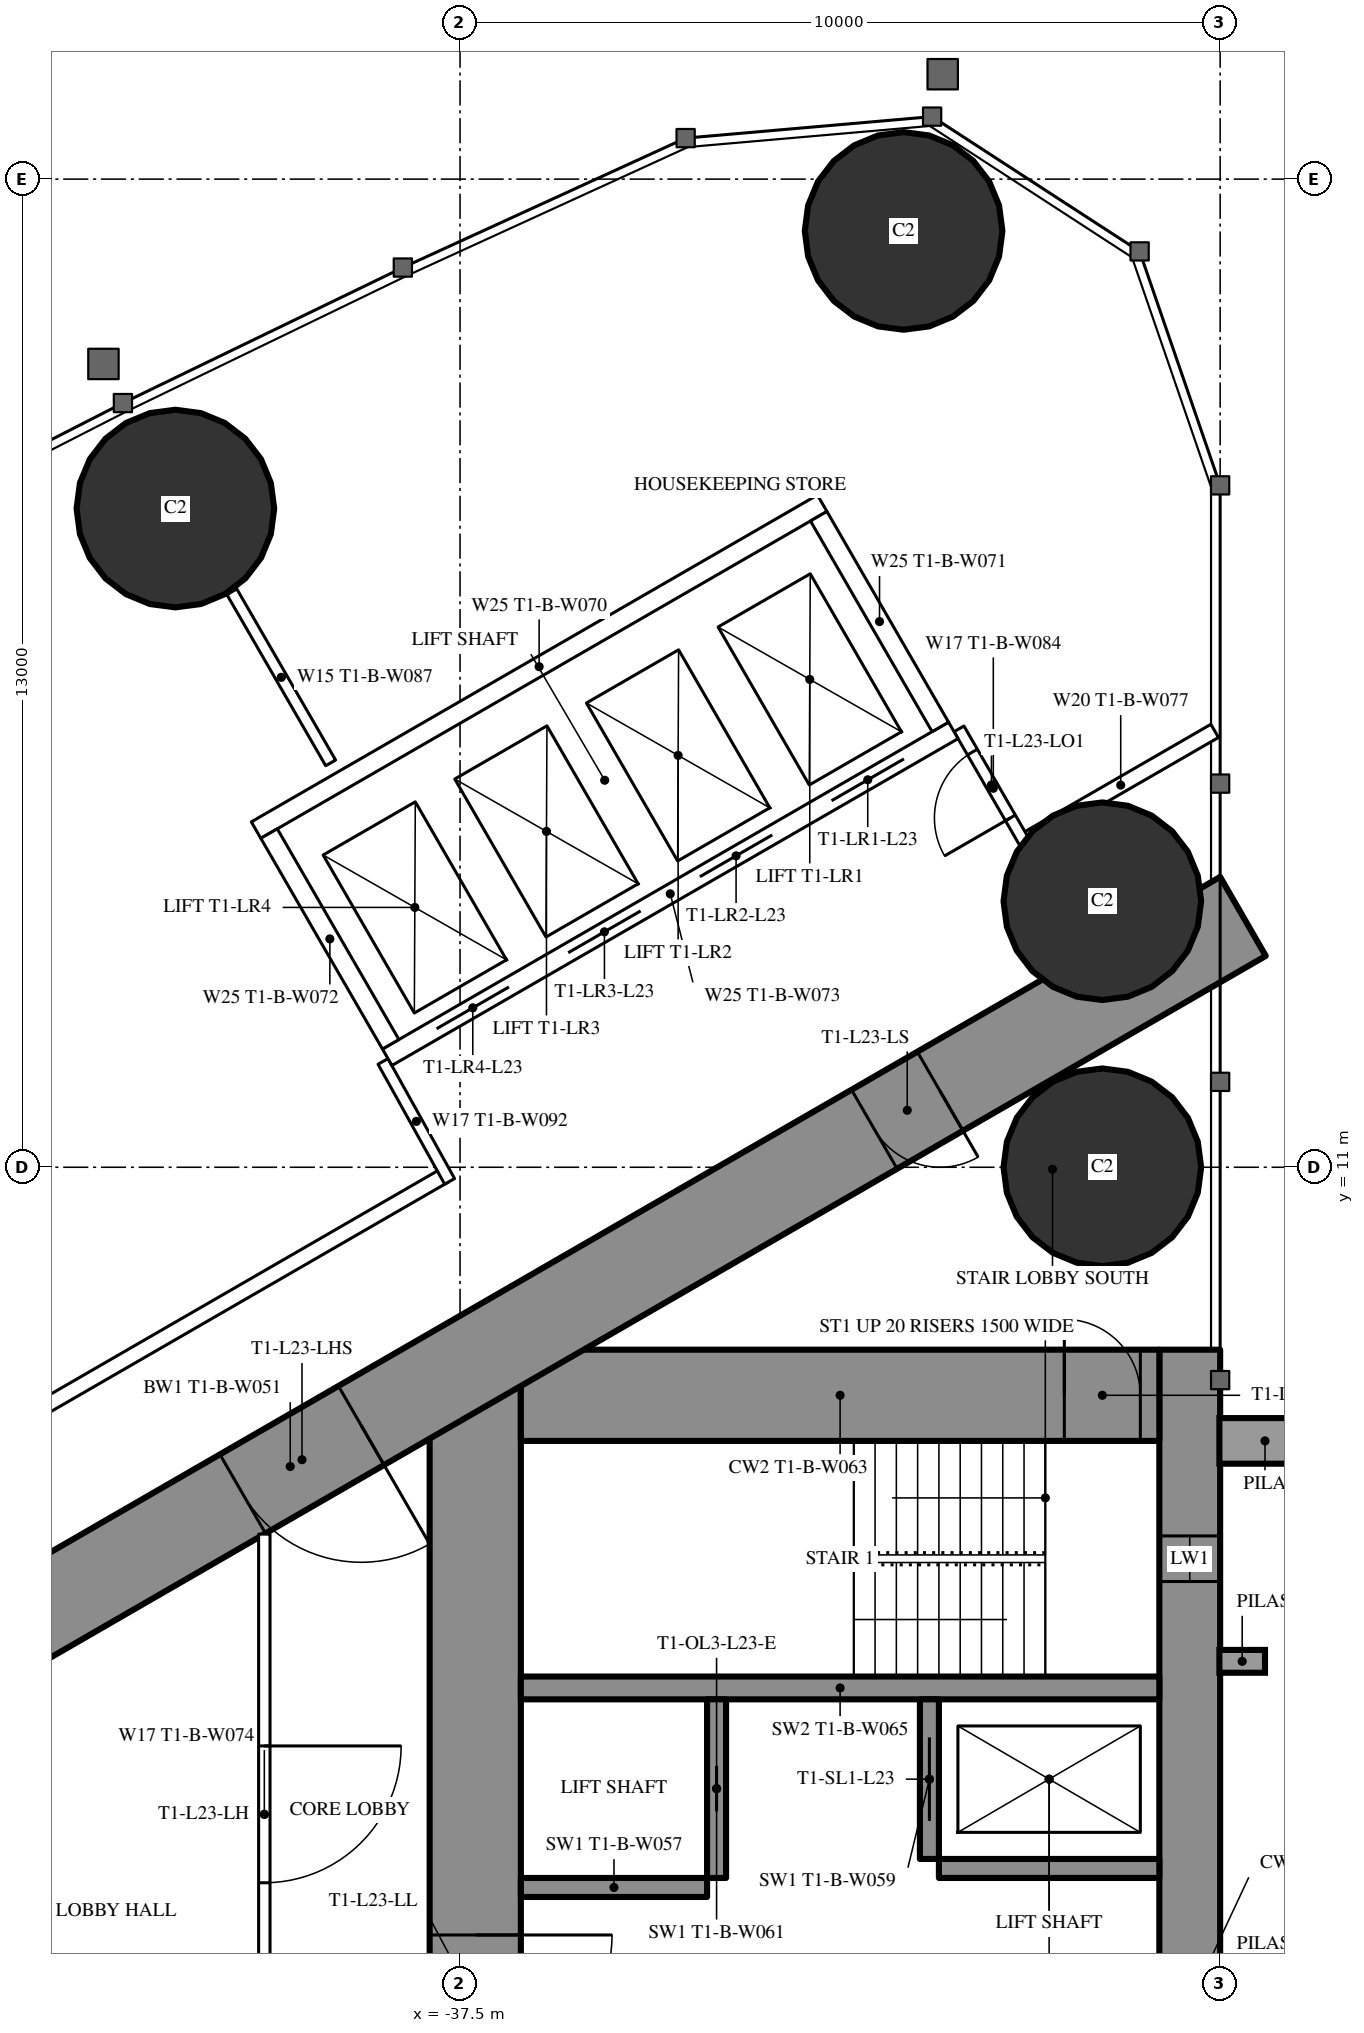
"""IFC4 building model, lengths in metres.
Left out: names, types, materials, properties, quantities, classifications, styles, units other than length and angle.
Written with IfcOpenShell. Run it as: python <this file> out.ifc"""

import sys

from ifc_helpers import new_model, si_unit, direction, frame, frame_2d, origin, origin_2d, place, context, subcontext, project, spatial, rectangle, hollow_circle, extrude, element, fill, save


model = new_model("IFC4")
c1 = context("Model", 3, precision=1e-05, world=origin(), true_north=direction((0.0, 1.0)))
c2 = subcontext(c1, "Body", "Model", "MODEL_VIEW")
j1 = project(units=[si_unit("LENGTHUNIT", "METRE"), si_unit("PLANEANGLEUNIT", "RADIAN")], contexts=[c1])
p1 = place(None, origin())
s1 = spatial("IfcSite", under=j1, at=p1, CompositionType="ELEMENT")
p2 = place(p1, origin())
s2 = spatial("IfcBuilding", under=s1, at=p2, CompositionType="ELEMENT")
p3 = place(p2, frame((0.0, 0.0, 90.6)))
s3 = spatial("IfcBuildingStorey", under=s2, at=p3, CompositionType="ELEMENT", Elevation=90.6)
for number, where, z_axis, x_axis in (
    (1, (-31.665, 23.318, 0.0), (0.0, 0.0, 1.0), (1.0, 0.0, 0.0)),
    (2, (-29.05, 11.0, 0.0), (0.0, 0.0, 1.0), (1.0, 0.0, 0.0)),
    (3, (-29.05, 14.5, 0.0), (0.0, 0.0, 1.0), (1.0, 0.0, 0.0)),
    (4, (-41.245, 19.666, 0.0), (0.0, 0.0, 1.0), (1.0, 0.0, 0.0)),
):
    element("IfcColumn", number, at=place(p3, frame(where, z_axis=z_axis, x_axis=x_axis)), inside=s3, PredefinedType="COLUMN", context=c2, shape_type="SweptSolid", body=[
        extrude(hollow_circle(Radius=1.3, WallThickness=0.1, at=origin_2d()), origin(), (0.0, 0.0, 1.0), 3.5),
    ])
p4 = place(p3, frame((-27.9, 8.6, 0.0), z_axis=(0.0, 0.0, 1.0), x_axis=(0.0, -1.0, 0.0)))
e5 = element("IfcWall", 5, at=p4, inside=s3, PredefinedType="SHEAR", context=c2, shape_type="SweptSolid", body=[
    extrude(rectangle(XDim=17.2, YDim=0.8, at=frame_2d((8.6, 0.0))), origin(), (0.0, 0.0, 1.0), 3.5),
])
p5 = place(p4, frame((2.45, 0.0, 0.6)))
e6 = element("IfcOpeningElement", 6, at=p5, cuts=e5, PredefinedType="OPENING", context=c2, shape_type="SweptSolid", body=[
    extrude(rectangle(XDim=0.6, YDim=2.1, at=frame_2d((0.3, 1.05))), frame((0.0, 0.41, 0.0), z_axis=(0.0, -1.0, 0.0), x_axis=(1.0, 0.0, 0.0)), (0.0, 0.0, 1.0), 0.82),
])
p6 = place(p4, frame((14.15, 0.0, 0.6)))
e7 = element("IfcOpeningElement", 7, at=p6, cuts=e5, PredefinedType="OPENING", context=c2, shape_type="SweptSolid", body=[
    extrude(rectangle(XDim=0.6, YDim=2.1, at=frame_2d((0.3, 1.05))), frame((0.0, 0.41, 0.0), z_axis=(0.0, -1.0, 0.0), x_axis=(1.0, 0.0, 0.0)), (0.0, 0.0, 1.0), 0.82),
])
p7 = place(p3, frame((-37.3, 8.6, 0.0), z_axis=(0.0, 0.0, 1.0), x_axis=(0.0, -1.0, 0.0)))
e8 = element("IfcWall", 8, at=p7, inside=s3, PredefinedType="SHEAR", context=c2, shape_type="SweptSolid", body=[
    extrude(rectangle(XDim=17.2, YDim=1.2, at=frame_2d((8.6, 0.0))), origin(), (0.0, 0.0, 1.0), 3.5),
])
p8 = place(p7, frame((7.7, 0.0, 0.0)))
e9 = element("IfcOpeningElement", 9, at=p8, cuts=e8, PredefinedType="OPENING", context=c2, shape_type="SweptSolid", body=[
    extrude(rectangle(XDim=1.8, YDim=2.2, at=frame_2d((0.9, 1.1))), frame((0.0, 0.61, 0.0), z_axis=(0.0, -1.0, 0.0), x_axis=(1.0, 0.0, 0.0)), (0.0, 0.0, 1.0), 1.22),
])
p9 = place(p3, frame((-28.3, 8.0, 0.0), z_axis=(0.0, 0.0, 1.0), x_axis=(-1.0, 0.0, 0.0)))
e10 = element("IfcWall", 10, at=p9, inside=s3, PredefinedType="SHEAR", context=c2, shape_type="SweptSolid", body=[
    extrude(rectangle(XDim=8.4, YDim=1.2, at=frame_2d((4.2, 0.0))), origin(), (0.0, 0.0, 1.0), 3.5),
])
p10 = place(p9, frame((0.25, 0.0, 0.0)))
e11 = element("IfcOpeningElement", 11, at=p10, cuts=e10, PredefinedType="OPENING", context=c2, shape_type="SweptSolid", body=[
    extrude(rectangle(XDim=1.0, YDim=2.2, at=frame_2d((0.5, 1.1))), frame((0.0, 0.61, 0.0), z_axis=(0.0, -1.0, 0.0), x_axis=(1.0, 0.0, 0.0)), (0.0, 0.0, 1.0), 1.22),
])
p11 = place(p3, frame((-28.3, 4.15, 0.0), z_axis=(0.0, 0.0, 1.0), x_axis=(-1.0, 0.0, 0.0)))
e12 = element("IfcWall", 12, at=p11, inside=s3, PredefinedType="SHEAR", context=c2, shape_type="SweptSolid", body=[
    extrude(rectangle(XDim=8.4, YDim=0.3, at=frame_2d((4.2, 0.0))), origin(), (0.0, 0.0, 1.0), 3.5),
])
p12 = place(p3, frame((-31.325, 4.0, 0.0), z_axis=(0.0, 0.0, 1.0), x_axis=(0.0, -1.0, 0.0)))
e13 = element("IfcWall", 13, at=p12, inside=s3, PredefinedType="SHEAR", context=c2, shape_type="SweptSolid", body=[
    extrude(rectangle(XDim=2.1, YDim=0.25, at=frame_2d((1.05, 0.0))), origin(), (0.0, 0.0, 1.0), 3.5),
])
p13 = place(p12, frame((0.5, 0.0, 0.0)))
e14 = element("IfcOpeningElement", 14, at=p13, cuts=e13, PredefinedType="OPENING", context=c2, shape_type="SweptSolid", body=[
    extrude(rectangle(XDim=1.1, YDim=2.2, at=frame_2d((0.55, 1.1))), frame((0.0, 0.135, 0.0), z_axis=(0.0, -1.0, 0.0), x_axis=(1.0, 0.0, 0.0)), (0.0, 0.0, 1.0), 0.27),
])
p14 = place(p3, frame((-34.125, 4.0, 0.0), z_axis=(0.0, 0.0, 1.0), x_axis=(0.0, -1.0, 0.0)))
e15 = element("IfcWall", 15, at=p14, inside=s3, PredefinedType="SHEAR", context=c2, shape_type="SweptSolid", body=[
    extrude(rectangle(XDim=2.35, YDim=0.25, at=frame_2d((1.175, 0.0))), origin(), (0.0, 0.0, 1.0), 3.5),
])
p15 = place(p14, frame((0.875, 0.0, 0.0)))
e16 = element("IfcOpeningElement", 16, at=p15, cuts=e15, PredefinedType="OPENING", context=c2, shape_type="SweptSolid", body=[
    extrude(rectangle(XDim=0.6, YDim=2.0, at=frame_2d((0.3, 1.0))), frame((0.0, 0.135, 0.0), z_axis=(0.0, -1.0, 0.0), x_axis=(1.0, 0.0, 0.0)), (0.0, 0.0, 1.0), 0.27),
])
p16 = place(p3, frame((-28.3, 1.775, 0.0), z_axis=(0.0, 0.0, 1.0), x_axis=(-1.0, 0.0, 0.0)))
e17 = element("IfcWall", 17, at=p16, inside=s3, PredefinedType="SHEAR", context=c2, shape_type="SweptSolid", body=[
    extrude(rectangle(XDim=2.9, YDim=0.25, at=frame_2d((1.45, 0.0))), origin(), (0.0, 0.0, 1.0), 3.5),
])
p17 = place(p3, frame((-34.25, 1.525, 0.0), z_axis=(0.0, 0.0, 1.0), x_axis=(-1.0, 0.0, 0.0)))
e18 = element("IfcWall", 18, at=p17, inside=s3, PredefinedType="SHEAR", context=c2, shape_type="SweptSolid", body=[
    extrude(rectangle(XDim=2.45, YDim=0.25, at=frame_2d((1.225, 0.0))), origin(), (0.0, 0.0, 1.0), 3.5),
])
p18 = place(p3, frame((-27.2, 14.3, 0.0), z_axis=(0.0, 0.0, 1.0), x_axis=(-0.866026593062, -0.499997940104, 0.0)))
e19 = element("IfcWall", 19, at=p18, inside=s3, PredefinedType="SHEAR", context=c2, shape_type="SweptSolid", body=[
    extrude(rectangle(XDim=28.946, YDim=1.2, at=frame_2d((14.473, 0.0))), origin(), (0.0, 0.0, 1.0), 3.5),
])
p19 = place(p18, frame((4.6, 0.0, 0.0)))
e20 = element("IfcOpeningElement", 20, at=p19, cuts=e19, PredefinedType="OPENING", context=c2, shape_type="SweptSolid", body=[
    extrude(rectangle(XDim=1.0, YDim=2.2, at=frame_2d((0.5, 1.1))), frame((0.0, 0.61, 0.0), z_axis=(0.0, -1.0, 0.0), x_axis=(1.0, 0.0, 0.0)), (0.0, 0.0, 1.0), 1.22),
])
p20 = place(p18, frame((13.395, 0.0, 0.0)))
e21 = element("IfcOpeningElement", 21, at=p20, cuts=e19, PredefinedType="OPENING", context=c2, shape_type="SweptSolid", body=[
    extrude(rectangle(XDim=1.8, YDim=2.2, at=frame_2d((0.9, 1.1))), frame((0.0, 0.61, 0.0), z_axis=(0.0, -1.0, 0.0), x_axis=(1.0, 0.0, 0.0)), (0.0, 0.0, 1.0), 1.22),
])
p21 = place(p3, frame((-39.202, 16.32, 0.0), z_axis=(0.0, 0.0, 1.0), x_axis=(-0.499947391036, 0.866055775454, 0.0)))
e22 = element("IfcWall", 22, at=p21, inside=s3, PredefinedType="PARTITIONING", context=c2, shape_type="SweptSolid", body=[
    extrude(rectangle(XDim=2.599, YDim=0.15, at=frame_2d((1.3, 0.0))), origin(), (0.0, 0.0, 1.0), 3.25),
])
p22 = place(p3, frame((-27.572, 16.741, 0.0), z_axis=(0.0, 0.0, 1.0), x_axis=(-0.866034618596, -0.499984039138, 0.0)))
e23 = element("IfcWall", 23, at=p22, inside=s3, PredefinedType="PARTITIONING", context=c2, shape_type="SweptSolid", body=[
    extrude(rectangle(XDim=2.854, YDim=0.2, at=frame_2d((1.427, 0.0))), origin(), (0.0, 0.0, 1.0), 3.25),
])
p23 = place(p3, frame((-37.7, 10.894, 0.0), z_axis=(0.0, 0.0, 1.0), x_axis=(-0.866027905338, -0.499995667157, 0.0)))
e24 = element("IfcWall", 24, at=p23, inside=s3, PredefinedType="PARTITIONING", context=c2, shape_type="SweptSolid", body=[
    extrude(rectangle(XDim=21.787, YDim=0.2, at=frame_2d((10.894, 0.0))), origin(), (0.0, 0.0, 1.0), 3.25),
])
p24 = place(p23, frame((17.887, 0.0, 0.0)))
e25 = element("IfcOpeningElement", 25, at=p24, cuts=e24, PredefinedType="OPENING", context=c2, shape_type="SweptSolid", body=[
    extrude(rectangle(XDim=0.95, YDim=2.2, at=frame_2d((0.475, 1.1))), frame((0.0, 0.11, 0.0), z_axis=(0.0, -1.0, 0.0), x_axis=(1.0, 0.0, 0.0)), (0.0, 0.0, 1.0), 0.22),
])
p25 = place(p23, frame((9.531, 0.0, 0.0)))
e26 = element("IfcOpeningElement", 26, at=p25, cuts=e24, PredefinedType="OPENING", context=c2, shape_type="SweptSolid", body=[
    extrude(rectangle(XDim=0.95, YDim=2.2, at=frame_2d((0.475, 1.1))), frame((0.0, 0.11, 0.0), z_axis=(0.0, -1.0, 0.0), x_axis=(1.0, 0.0, 0.0)), (0.0, 0.0, 1.0), 0.22),
])
p26 = place(p3, frame((-38.513, 12.392, 0.0), z_axis=(0.0, 0.0, 1.0), x_axis=(0.485585508183, -0.874189175317, 0.0)))
e27 = element("IfcWall", 27, at=p26, inside=s3, PredefinedType="PARTITIONING", context=c2, shape_type="SweptSolid", body=[
    extrude(rectangle(XDim=1.805, YDim=0.15, at=frame_2d((0.902, 0.0))), origin(), (0.0, 0.0, 1.0), 3.25),
])
p27 = place(p3, frame((-30.033, 15.205, 0.0), z_axis=(0.0, 0.0, 1.0), x_axis=(-0.499980071345, 0.866036909293, 0.0)))
e28 = element("IfcWall", 28, at=p27, inside=s3, PredefinedType="PARTITIONING", context=c2, shape_type="SweptSolid", body=[
    extrude(rectangle(XDim=1.805, YDim=0.15, at=frame_2d((0.902, 0.0))), origin(), (0.0, 0.0, 1.0), 3.25),
])
p28 = place(p27, frame((0.452, 0.0, 0.0)))
e29 = element("IfcOpeningElement", 29, at=p28, cuts=e28, PredefinedType="OPENING", context=c2, shape_type="SweptSolid", body=[
    extrude(rectangle(XDim=1.0, YDim=2.2, at=frame_2d((0.5, 1.1))), frame((0.0, 0.085, 0.0), z_axis=(0.0, -1.0, 0.0), x_axis=(1.0, 0.0, 0.0)), (0.0, 0.0, 1.0), 0.17),
])
p29 = place(p3, frame((-40.075, 6.174, 0.0), z_axis=(0.0, 0.0, 1.0), x_axis=(0.0, -1.0, 0.0)))
e30 = element("IfcWall", 30, at=p29, inside=s3, PredefinedType="PARTITIONING", context=c2, shape_type="SweptSolid", body=[
    extrude(rectangle(XDim=7.374, YDim=0.15, at=frame_2d((3.687, 0.0))), origin(), (0.0, 0.0, 1.0), 3.25),
])
p30 = place(p29, frame((2.787, 0.0, 0.0)))
e31 = element("IfcOpeningElement", 31, at=p30, cuts=e30, PredefinedType="OPENING", context=c2, shape_type="SweptSolid", body=[
    extrude(rectangle(XDim=1.8, YDim=2.2, at=frame_2d((0.9, 1.1))), frame((0.0, 0.085, 0.0), z_axis=(0.0, -1.0, 0.0), x_axis=(1.0, 0.0, 0.0)), (0.0, 0.0, 1.0), 0.17),
])
p31 = place(p3, frame((-31.01, 16.747, 0.0), z_axis=(0.0, 0.0, 1.0), x_axis=(-0.866028165386, -0.499995216735, 0.0)))
e32 = element("IfcWall", 32, at=p31, inside=s3, PredefinedType="PARTITIONING", context=c2, shape_type="SweptSolid", body=[
    extrude(rectangle(XDim=8.6, YDim=0.25, at=frame_2d((4.3, 0.0))), origin(), (0.0, 0.0, 1.0), 3.25),
])
p32 = place(p31, frame((0.75, 0.0, 0.0)))
e33 = element("IfcOpeningElement", 33, at=p32, cuts=e32, PredefinedType="OPENING", context=c2, shape_type="SweptSolid", body=[
    extrude(rectangle(XDim=1.1, YDim=2.2, at=frame_2d((0.55, 1.1))), frame((0.0, 0.135, 0.0), z_axis=(0.0, -1.0, 0.0), x_axis=(1.0, 0.0, 0.0)), (0.0, 0.0, 1.0), 0.27),
])
p33 = place(p31, frame((2.75, 0.0, 0.0)))
e34 = element("IfcOpeningElement", 34, at=p33, cuts=e32, PredefinedType="OPENING", context=c2, shape_type="SweptSolid", body=[
    extrude(rectangle(XDim=1.1, YDim=2.2, at=frame_2d((0.55, 1.1))), frame((0.0, 0.135, 0.0), z_axis=(0.0, -1.0, 0.0), x_axis=(1.0, 0.0, 0.0)), (0.0, 0.0, 1.0), 0.27),
])
p34 = place(p31, frame((4.75, 0.0, 0.0)))
e35 = element("IfcOpeningElement", 35, at=p34, cuts=e32, PredefinedType="OPENING", context=c2, shape_type="SweptSolid", body=[
    extrude(rectangle(XDim=1.1, YDim=2.2, at=frame_2d((0.55, 1.1))), frame((0.0, 0.135, 0.0), z_axis=(0.0, -1.0, 0.0), x_axis=(1.0, 0.0, 0.0)), (0.0, 0.0, 1.0), 0.27),
])
p35 = place(p31, frame((6.75, 0.0, 0.0)))
e36 = element("IfcOpeningElement", 36, at=p35, cuts=e32, PredefinedType="OPENING", context=c2, shape_type="SweptSolid", body=[
    extrude(rectangle(XDim=1.1, YDim=2.2, at=frame_2d((0.55, 1.1))), frame((0.0, 0.135, 0.0), z_axis=(0.0, -1.0, 0.0), x_axis=(1.0, 0.0, 0.0)), (0.0, 0.0, 1.0), 0.27),
])
p36 = place(p3, frame((-32.736, 19.736, 0.0), z_axis=(0.0, 0.0, 1.0), x_axis=(-0.866028165386, -0.499995216735, 0.0)))
e37 = element("IfcWall", 37, at=p36, inside=s3, PredefinedType="PARTITIONING", context=c2, shape_type="SweptSolid", body=[
    extrude(rectangle(XDim=8.6, YDim=0.25, at=frame_2d((4.3, 0.0))), origin(), (0.0, 0.0, 1.0), 3.25),
])
p37 = place(p3, frame((-31.181, 16.793, 0.0), z_axis=(0.0, 0.0, 1.0), x_axis=(-0.499929347863, 0.866066190972, 0.0)))
e38 = element("IfcWall", 38, at=p37, inside=s3, PredefinedType="PARTITIONING", context=c2, shape_type="SweptSolid", body=[
    extrude(rectangle(XDim=3.201, YDim=0.25, at=frame_2d((1.6, 0.0))), origin(), (0.0, 0.0, 1.0), 3.25),
])
p38 = place(p3, frame((-38.413, 12.618, 0.0), z_axis=(0.0, 0.0, 1.0), x_axis=(-0.499872130319, 0.866099216793, 0.0)))
e39 = element("IfcWall", 39, at=p38, inside=s3, PredefinedType="PARTITIONING", context=c2, shape_type="SweptSolid", body=[
    extrude(rectangle(XDim=3.2, YDim=0.25, at=frame_2d((1.6, 0.0))), origin(), (0.0, 0.0, 1.0), 3.25),
])
p39 = place(p28, origin())
e40 = element("IfcDoor", 40, at=p39, inside=s3, OperationType="SINGLE_SWING_LEFT", PredefinedType="DOOR", context=c2, shape_type="SweptSolid", body=[
    extrude(rectangle(XDim=1.0, YDim=2.2, at=frame_2d((0.5, 1.1))), frame((0.0, 0.025, 0.0), z_axis=(0.0, -1.0, 0.0), x_axis=(1.0, 0.0, 0.0)), (0.0, 0.0, 1.0), 0.05),
])
fill(e29, e40)
p40 = place(p30, origin())
e41 = element("IfcDoor", 41, at=p40, inside=s3, OperationType="DOUBLE_DOOR_SINGLE_SWING", PredefinedType="DOOR", context=c2, shape_type="SweptSolid", body=[
    extrude(rectangle(XDim=1.8, YDim=2.2, at=frame_2d((0.9, 1.1))), frame((0.0, 0.025, 0.0), z_axis=(0.0, -1.0, 0.0), x_axis=(1.0, 0.0, 0.0)), (0.0, 0.0, 1.0), 0.05),
])
fill(e31, e41)
p41 = place(p19, origin())
e42 = element("IfcDoor", 42, at=p41, inside=s3, OperationType="SINGLE_SWING_LEFT", PredefinedType="DOOR", context=c2, shape_type="SweptSolid", body=[
    extrude(rectangle(XDim=1.0, YDim=2.2, at=frame_2d((0.5, 1.1))), frame((0.0, 0.025, 0.0), z_axis=(0.0, -1.0, 0.0), x_axis=(1.0, 0.0, 0.0)), (0.0, 0.0, 1.0), 0.05),
])
fill(e20, e42)
p42 = place(p20, origin())
e43 = element("IfcDoor", 43, at=p42, inside=s3, OperationType="DOUBLE_DOOR_SINGLE_SWING", PredefinedType="DOOR", context=c2, shape_type="SweptSolid", body=[
    extrude(rectangle(XDim=1.8, YDim=2.2, at=frame_2d((0.9, 1.1))), frame((0.0, 0.025, 0.0), z_axis=(0.0, -1.0, 0.0), x_axis=(1.0, 0.0, 0.0)), (0.0, 0.0, 1.0), 0.05),
])
fill(e21, e43)
p43 = place(p8, origin())
e44 = element("IfcDoor", 44, at=p43, inside=s3, OperationType="DOUBLE_DOOR_SINGLE_SWING", PredefinedType="DOOR", context=c2, shape_type="SweptSolid", body=[
    extrude(rectangle(XDim=1.8, YDim=2.2, at=frame_2d((0.9, 1.1))), frame((0.0, 0.025, 0.0), z_axis=(0.0, -1.0, 0.0), x_axis=(1.0, 0.0, 0.0)), (0.0, 0.0, 1.0), 0.05),
])
fill(e9, e44)
p44 = place(p10, origin())
e45 = element("IfcDoor", 45, at=p44, inside=s3, OperationType="SINGLE_SWING_RIGHT", PredefinedType="DOOR", context=c2, shape_type="SweptSolid", body=[
    extrude(rectangle(XDim=1.0, YDim=2.2, at=frame_2d((0.5, 1.1))), frame((0.0, 0.025, 0.0), z_axis=(0.0, -1.0, 0.0), x_axis=(1.0, 0.0, 0.0)), (0.0, 0.0, 1.0), 0.05),
])
fill(e11, e45)
p45 = place(p13, origin())
e46 = element("IfcDoor", 46, at=p45, inside=s3, OperationType="SLIDING_TO_LEFT", PredefinedType="USERDEFINED", context=c2, shape_type="SweptSolid", body=[
    extrude(rectangle(XDim=1.1, YDim=2.2, at=frame_2d((0.55, 1.1))), frame((0.0, 0.025, 0.0), z_axis=(0.0, -1.0, 0.0), x_axis=(1.0, 0.0, 0.0)), (0.0, 0.0, 1.0), 0.05),
])
fill(e14, e46)
p46 = place(p15, origin())
e47 = element("IfcDoor", 47, at=p46, inside=s3, OperationType="SLIDING_TO_LEFT", PredefinedType="DOOR", context=c2, shape_type="SweptSolid", body=[
    extrude(rectangle(XDim=0.6, YDim=2.0, at=frame_2d((0.3, 1.0))), frame((0.0, 0.025, 0.0), z_axis=(0.0, -1.0, 0.0), x_axis=(1.0, 0.0, 0.0)), (0.0, 0.0, 1.0), 0.05),
])
fill(e16, e47)
p47 = place(p32, origin())
e48 = element("IfcDoor", 48, at=p47, inside=s3, OperationType="DOUBLE_DOOR_SLIDING", PredefinedType="USERDEFINED", context=c2, shape_type="SweptSolid", body=[
    extrude(rectangle(XDim=1.1, YDim=2.2, at=frame_2d((0.55, 1.1))), frame((0.0, 0.025, 0.0), z_axis=(0.0, -1.0, 0.0), x_axis=(1.0, 0.0, 0.0)), (0.0, 0.0, 1.0), 0.05),
])
fill(e33, e48)
p48 = place(p33, origin())
e49 = element("IfcDoor", 49, at=p48, inside=s3, OperationType="DOUBLE_DOOR_SLIDING", PredefinedType="USERDEFINED", context=c2, shape_type="SweptSolid", body=[
    extrude(rectangle(XDim=1.1, YDim=2.2, at=frame_2d((0.55, 1.1))), frame((0.0, 0.025, 0.0), z_axis=(0.0, -1.0, 0.0), x_axis=(1.0, 0.0, 0.0)), (0.0, 0.0, 1.0), 0.05),
])
fill(e34, e49)
p49 = place(p34, origin())
e50 = element("IfcDoor", 50, at=p49, inside=s3, OperationType="DOUBLE_DOOR_SLIDING", PredefinedType="USERDEFINED", context=c2, shape_type="SweptSolid", body=[
    extrude(rectangle(XDim=1.1, YDim=2.2, at=frame_2d((0.55, 1.1))), frame((0.0, 0.025, 0.0), z_axis=(0.0, -1.0, 0.0), x_axis=(1.0, 0.0, 0.0)), (0.0, 0.0, 1.0), 0.05),
])
fill(e35, e50)
p50 = place(p35, origin())
e51 = element("IfcDoor", 51, at=p50, inside=s3, OperationType="DOUBLE_DOOR_SLIDING", PredefinedType="USERDEFINED", context=c2, shape_type="SweptSolid", body=[
    extrude(rectangle(XDim=1.1, YDim=2.2, at=frame_2d((0.55, 1.1))), frame((0.0, 0.025, 0.0), z_axis=(0.0, -1.0, 0.0), x_axis=(1.0, 0.0, 0.0)), (0.0, 0.0, 1.0), 0.05),
])
fill(e36, e51)
p51 = place(p5, origin())
e52 = element("IfcWindow", 52, at=p51, inside=s3, PartitioningType="SINGLE_PANEL", PredefinedType="WINDOW", context=c2, shape_type="SweptSolid", body=[
    extrude(rectangle(XDim=0.6, YDim=2.1, at=frame_2d((0.3, 1.05))), frame((0.0, 0.03, 0.0), z_axis=(0.0, -1.0, 0.0), x_axis=(1.0, 0.0, 0.0)), (0.0, 0.0, 1.0), 0.06),
])
fill(e6, e52)
save(model, sys.argv[1])
